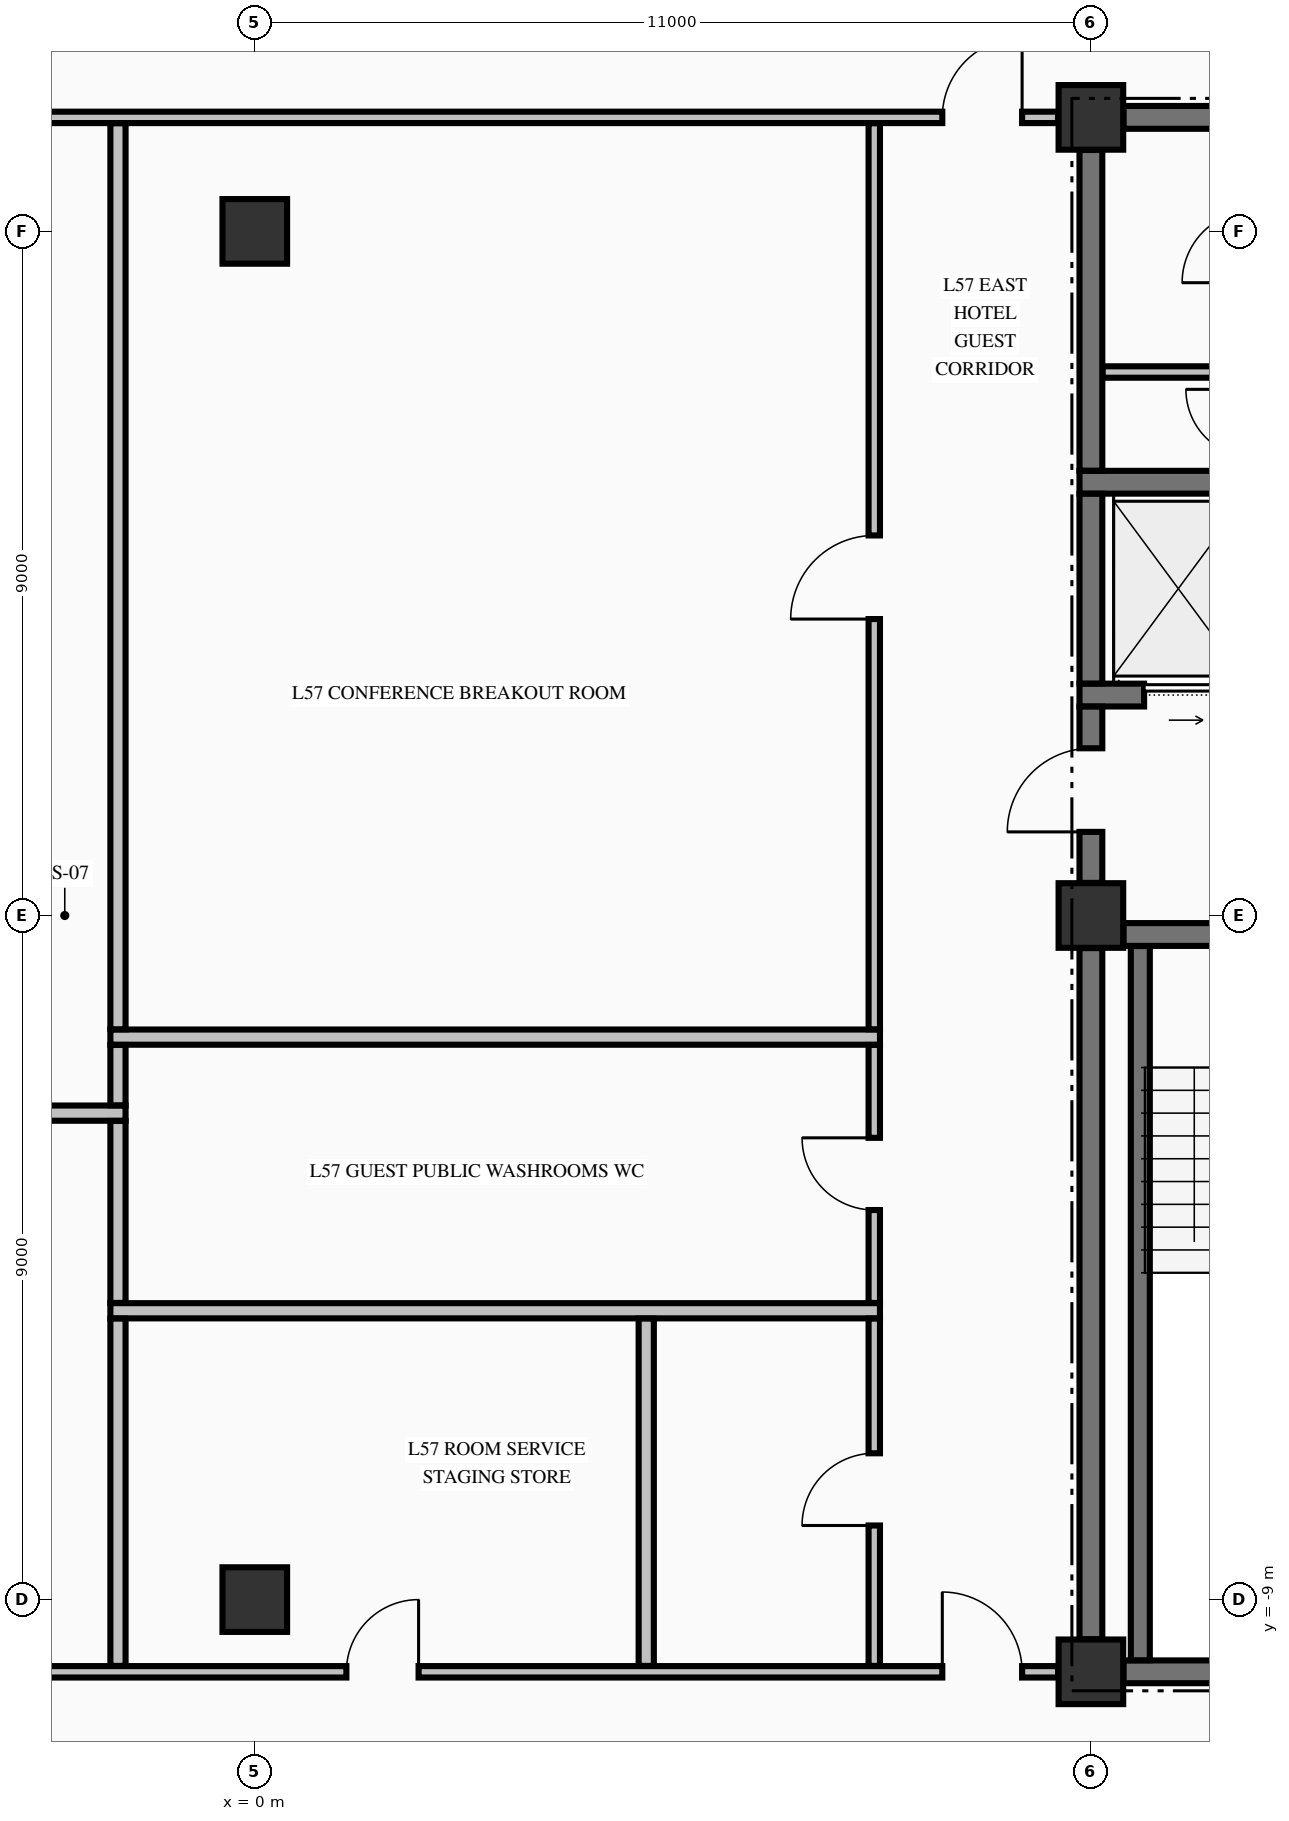
"""IFC4 building model, lengths in metres.
Left out: names, types, materials, properties, quantities, classifications, styles, units other than length and angle.
Written with IfcOpenShell. Run it as: python <this file> out.ifc"""

import sys

from ifc_helpers import new_model, si_unit, direction, frame, frame_2d, origin, origin_2d, place, context, subcontext, project, spatial, rectangle, extrude, element, fill, save


model = new_model("IFC4")
c1 = context("Model", 3, precision=1e-05, world=origin(), true_north=direction((0.0, 1.0)))
c2 = subcontext(c1, "Body", "Model", "MODEL_VIEW")
j1 = project(units=[si_unit("LENGTHUNIT", "METRE"), si_unit("PLANEANGLEUNIT", "RADIAN")], contexts=[c1])
p1 = place(None, origin())
s1 = spatial("IfcSite", under=j1, at=p1, CompositionType="ELEMENT")
p2 = place(p1, origin())
s2 = spatial("IfcBuilding", under=s1, at=p2, CompositionType="ELEMENT")
p3 = place(p2, frame((0.0, 0.0, 218.66)))
s3 = spatial("IfcBuildingStorey", under=s2, at=p3, CompositionType="ELEMENT", Elevation=218.66)
for number, where, z_axis, x_axis in (
    (1, (11.0, -9.95, -0.25), (0.0, 0.0, 1.0), (1.0, 0.0, 0.0)),
    (2, (11.0, 0.0, -0.25), (0.0, 0.0, 1.0), (1.0, 0.0, 0.0)),
    (3, (11.0, 10.5, -0.25), (0.0, 0.0, 1.0), (1.0, 0.0, 0.0)),
    (4, (0.0, -9.0, -0.25), (0.0, 0.0, 1.0), (1.0, 0.0, 0.0)),
    (5, (0.0, 9.0, -0.25), (0.0, 0.0, 1.0), (1.0, 0.0, 0.0)),
):
    element("IfcColumn", number, at=place(p3, frame(where, z_axis=z_axis, x_axis=x_axis)), inside=s3, PredefinedType="COLUMN", context=c2, shape_type="SweptSolid", body=[
        extrude(rectangle(XDim=0.85, YDim=0.85, at=origin_2d()), origin(), (0.0, 0.0, 1.0), 3.225),
    ])
p4 = place(p3, frame((11.429, -9.95, 0.0), z_axis=(0.0, 0.0, 1.0), x_axis=(1.0, 0.0, 0.0)))
e6 = element("IfcWall", 6, at=p4, inside=s3, PredefinedType="SHEAR", context=c2, shape_type="SweptSolid", body=[
    extrude(rectangle(XDim=3.271, YDim=0.3, at=frame_2d((1.635, 0.0))), origin(), (0.0, 0.0, 1.0), 2.975),
])
p5 = place(p3, frame((11.429, -0.25, 0.0), z_axis=(0.0, 0.0, 1.0), x_axis=(1.0, 0.0, 0.0)))
e7 = element("IfcWall", 7, at=p5, inside=s3, PredefinedType="SHEAR", context=c2, shape_type="SweptSolid", body=[
    extrude(rectangle(XDim=3.446, YDim=0.3, at=frame_2d((1.723, 0.0))), origin(), (0.0, 0.0, 1.0), 2.975),
])
p6 = place(p5, frame((1.171, 0.0, 0.0)))
e8 = element("IfcOpeningElement", 8, at=p6, cuts=e7, PredefinedType="OPENING", context=c2, shape_type="SweptSolid", body=[
    extrude(rectangle(XDim=1.1, YDim=2.15, at=frame_2d((0.55, 1.075))), frame((0.0, 0.16, 0.0), z_axis=(0.0, -1.0, 0.0), x_axis=(1.0, 0.0, 0.0)), (0.0, 0.0, 1.0), 0.32),
])
p7 = place(p3, frame((10.85, 2.9, 0.0), z_axis=(0.0, 0.0, 1.0), x_axis=(1.0, 0.0, 0.0)))
e9 = element("IfcWall", 9, at=p7, inside=s3, PredefinedType="SHEAR", context=c2, shape_type="SweptSolid", body=[
    extrude(rectangle(XDim=4.025, YDim=0.3, at=frame_2d((2.012, 0.0))), origin(), (0.0, 0.0, 1.0), 2.975),
])
p8 = place(p7, frame((0.85, 0.0, 0.0)))
e10 = element("IfcOpeningElement", 10, at=p8, cuts=e9, PredefinedType="OPENING", context=c2, shape_type="SweptSolid", body=[
    extrude(rectangle(XDim=1.1, YDim=2.2, at=frame_2d((0.55, 1.1))), frame((0.0, 0.16, 0.0), z_axis=(0.0, -1.0, 0.0), x_axis=(1.0, 0.0, 0.0)), (0.0, 0.0, 1.0), 0.32),
])
p9 = place(p3, frame((10.85, 5.7, 0.0), z_axis=(0.0, 0.0, 1.0), x_axis=(1.0, 0.0, 0.0)))
e11 = element("IfcWall", 11, at=p9, inside=s3, PredefinedType="SHEAR", context=c2, shape_type="SweptSolid", body=[
    extrude(rectangle(XDim=4.025, YDim=0.3, at=frame_2d((2.012, 0.0))), origin(), (0.0, 0.0, 1.0), 2.975),
])
p10 = place(p3, frame((11.429, 10.5, 0.0), z_axis=(0.0, 0.0, 1.0), x_axis=(1.0, 0.0, 0.0)))
e12 = element("IfcWall", 12, at=p10, inside=s3, PredefinedType="SHEAR", context=c2, shape_type="SweptSolid", body=[
    extrude(rectangle(XDim=3.271, YDim=0.3, at=frame_2d((1.635, 0.0))), origin(), (0.0, 0.0, 1.0), 2.975),
])
p11 = place(p10, frame((2.016, 0.0, 0.0)))
e13 = element("IfcOpeningElement", 13, at=p11, cuts=e12, PredefinedType="OPENING", context=c2, shape_type="SweptSolid", body=[
    extrude(rectangle(XDim=0.95, YDim=2.02, at=frame_2d((0.475, 1.01))), frame((0.0, 0.16, 0.0), z_axis=(0.0, -1.0, 0.0), x_axis=(1.0, 0.0, 0.0)), (0.0, 0.0, 1.0), 0.32),
])
p12 = place(p3, frame((-10.569, -9.95, 0.0), z_axis=(0.0, 0.0, 1.0), x_axis=(1.0, 0.0, 0.0)))
e14 = element("IfcWall", 14, at=p12, inside=s3, PredefinedType="PARTITIONING", context=c2, shape_type="SweptSolid", body=[
    extrude(rectangle(XDim=21.138, YDim=0.15, at=frame_2d((10.569, 0.0))), origin(), (0.0, 0.0, 1.0), 2.975),
])
p13 = place(p12, frame((0.474, 0.0, 0.0)))
e15 = element("IfcOpeningElement", 15, at=p13, cuts=e14, PredefinedType="OPENING", context=c2, shape_type="SweptSolid", body=[
    extrude(rectangle(XDim=1.05, YDim=2.15, at=frame_2d((0.525, 1.075))), frame((0.0, 0.085, 0.0), z_axis=(0.0, -1.0, 0.0), x_axis=(1.0, 0.0, 0.0)), (0.0, 0.0, 1.0), 0.17),
])
p14 = place(p12, frame((19.614, 0.0, 0.0)))
e16 = element("IfcOpeningElement", 16, at=p14, cuts=e14, PredefinedType="OPENING", context=c2, shape_type="SweptSolid", body=[
    extrude(rectangle(XDim=1.05, YDim=2.15, at=frame_2d((0.525, 1.075))), frame((0.0, 0.085, 0.0), z_axis=(0.0, -1.0, 0.0), x_axis=(1.0, 0.0, 0.0)), (0.0, 0.0, 1.0), 0.17),
])
p15 = place(p12, frame((11.774, 0.0, 0.0)))
e17 = element("IfcOpeningElement", 17, at=p15, cuts=e14, PredefinedType="OPENING", context=c2, shape_type="SweptSolid", body=[
    extrude(rectangle(XDim=0.95, YDim=2.15, at=frame_2d((0.475, 1.075))), frame((0.0, 0.085, 0.0), z_axis=(0.0, -1.0, 0.0), x_axis=(1.0, 0.0, 0.0)), (0.0, 0.0, 1.0), 0.17),
])
p16 = place(p3, frame((-1.9, -5.2, 0.0), z_axis=(0.0, 0.0, 1.0), x_axis=(1.0, 0.0, 0.0)))
e18 = element("IfcWall", 18, at=p16, inside=s3, PredefinedType="PARTITIONING", context=c2, shape_type="SweptSolid", body=[
    extrude(rectangle(XDim=10.125, YDim=0.2, at=frame_2d((5.062, 0.0))), origin(), (0.0, 0.0, 1.0), 2.975),
])
p17 = place(p3, frame((-8.225, -2.6, 0.0), z_axis=(0.0, 0.0, 1.0), x_axis=(1.0, 0.0, 0.0)))
e19 = element("IfcWall", 19, at=p17, inside=s3, PredefinedType="PARTITIONING", context=c2, shape_type="SweptSolid", body=[
    extrude(rectangle(XDim=6.525, YDim=0.2, at=frame_2d((3.263, 0.0))), origin(), (0.0, 0.0, 1.0), 2.975),
])
p18 = place(p3, frame((-1.9, -1.6, 0.0), z_axis=(0.0, 0.0, 1.0), x_axis=(1.0, 0.0, 0.0)))
e20 = element("IfcWall", 20, at=p18, inside=s3, PredefinedType="PARTITIONING", context=c2, shape_type="SweptSolid", body=[
    extrude(rectangle(XDim=10.125, YDim=0.2, at=frame_2d((5.062, 0.0))), origin(), (0.0, 0.0, 1.0), 2.975),
])
p19 = place(p3, frame((11.153, 7.15, 0.0), z_axis=(0.0, 0.0, 1.0), x_axis=(1.0, 0.0, 0.0)))
e21 = element("IfcWall", 21, at=p19, inside=s3, PredefinedType="PARTITIONING", context=c2, shape_type="SweptSolid", body=[
    extrude(rectangle(XDim=2.072, YDim=0.15, at=frame_2d((1.036, 0.0))), origin(), (0.0, 0.0, 1.0), 2.975),
])
p20 = place(p3, frame((-10.569, 10.5, 0.0), z_axis=(0.0, 0.0, 1.0), x_axis=(1.0, 0.0, 0.0)))
e22 = element("IfcWall", 22, at=p20, inside=s3, PredefinedType="PARTITIONING", context=c2, shape_type="SweptSolid", body=[
    extrude(rectangle(XDim=21.138, YDim=0.15, at=frame_2d((10.569, 0.0))), origin(), (0.0, 0.0, 1.0), 2.975),
])
p21 = place(p20, frame((0.474, 0.0, 0.0)))
e23 = element("IfcOpeningElement", 23, at=p21, cuts=e22, PredefinedType="OPENING", context=c2, shape_type="SweptSolid", body=[
    extrude(rectangle(XDim=1.05, YDim=2.15, at=frame_2d((0.525, 1.075))), frame((0.0, 0.085, 0.0), z_axis=(0.0, -1.0, 0.0), x_axis=(1.0, 0.0, 0.0)), (0.0, 0.0, 1.0), 0.17),
])
p22 = place(p20, frame((19.614, 0.0, 0.0)))
e24 = element("IfcOpeningElement", 24, at=p22, cuts=e22, PredefinedType="OPENING", context=c2, shape_type="SweptSolid", body=[
    extrude(rectangle(XDim=1.05, YDim=2.15, at=frame_2d((0.525, 1.075))), frame((0.0, 0.085, 0.0), z_axis=(0.0, -1.0, 0.0), x_axis=(1.0, 0.0, 0.0)), (0.0, 0.0, 1.0), 0.17),
])
p23 = place(p3, frame((11.0, -9.521, 0.0), z_axis=(0.0, 0.0, 1.0), x_axis=(0.0, 1.0, 0.0)))
e25 = element("IfcWall", 25, at=p23, inside=s3, PredefinedType="SHEAR", context=c2, shape_type="SweptSolid", body=[
    extrude(rectangle(XDim=9.092, YDim=0.3, at=frame_2d((4.546, 0.0))), origin(), (0.0, 0.0, 1.0), 2.975),
])
p24 = place(p3, frame((11.0, 0.429, 0.0), z_axis=(0.0, 0.0, 1.0), x_axis=(0.0, 1.0, 0.0)))
e26 = element("IfcWall", 26, at=p24, inside=s3, PredefinedType="SHEAR", context=c2, shape_type="SweptSolid", body=[
    extrude(rectangle(XDim=2.319, YDim=0.3, at=frame_2d((1.16, 0.0))), origin(), (0.0, 0.0, 1.0), 2.975),
])
p25 = place(p24, frame((0.671, 0.0, 0.0)))
e27 = element("IfcOpeningElement", 27, at=p25, cuts=e26, PredefinedType="OPENING", context=c2, shape_type="SweptSolid", body=[
    extrude(rectangle(XDim=1.1, YDim=2.15, at=frame_2d((0.55, 1.075))), frame((0.0, 0.16, 0.0), z_axis=(0.0, -1.0, 0.0), x_axis=(1.0, 0.0, 0.0)), (0.0, 0.0, 1.0), 0.32),
])
p26 = place(p3, frame((11.0, 3.052, 0.0), z_axis=(0.0, 0.0, 1.0), x_axis=(0.0, 1.0, 0.0)))
e28 = element("IfcWall", 28, at=p26, inside=s3, PredefinedType="SHEAR", context=c2, shape_type="SweptSolid", body=[
    extrude(rectangle(XDim=2.496, YDim=0.3, at=frame_2d((1.248, 0.0))), origin(), (0.0, 0.0, 1.0), 2.975),
])
p27 = place(p3, frame((11.0, 5.852, 0.0), z_axis=(0.0, 0.0, 1.0), x_axis=(0.0, 1.0, 0.0)))
e29 = element("IfcWall", 29, at=p27, inside=s3, PredefinedType="SHEAR", context=c2, shape_type="SweptSolid", body=[
    extrude(rectangle(XDim=4.219, YDim=0.3, at=frame_2d((2.109, 0.0))), origin(), (0.0, 0.0, 1.0), 2.975),
])
p28 = place(p3, frame((11.65, -9.798, 0.0), z_axis=(0.0, 0.0, 1.0), x_axis=(0.0, 1.0, 0.0)))
e30 = element("IfcWall", 30, at=p28, inside=s3, PredefinedType="SOLIDWALL", context=c2, shape_type="SweptSolid", body=[
    extrude(rectangle(XDim=9.396, YDim=0.25, at=frame_2d((4.698, 0.0))), origin(), (0.0, 0.0, 1.0), 2.975),
])
p29 = place(p3, frame((-1.8, -9.872, 0.0), z_axis=(0.0, 0.0, 1.0), x_axis=(0.0, 1.0, 0.0)))
e31 = element("IfcWall", 31, at=p29, inside=s3, PredefinedType="PARTITIONING", context=c2, shape_type="SweptSolid", body=[
    extrude(rectangle(XDim=4.569, YDim=0.2, at=frame_2d((2.285, 0.0))), origin(), (0.0, 0.0, 1.0), 2.975),
])
p30 = place(p3, frame((-1.8, -5.097, 0.0), z_axis=(0.0, 0.0, 1.0), x_axis=(0.0, 1.0, 0.0)))
e32 = element("IfcWall", 32, at=p30, inside=s3, PredefinedType="PARTITIONING", context=c2, shape_type="SweptSolid", body=[
    extrude(rectangle(XDim=2.394, YDim=0.2, at=frame_2d((1.197, 0.0))), origin(), (0.0, 0.0, 1.0), 2.975),
])
p31 = place(p3, frame((-1.8, -2.497, 0.0), z_axis=(0.0, 0.0, 1.0), x_axis=(0.0, 1.0, 0.0)))
e33 = element("IfcWall", 33, at=p31, inside=s3, PredefinedType="PARTITIONING", context=c2, shape_type="SweptSolid", body=[
    extrude(rectangle(XDim=0.794, YDim=0.2, at=frame_2d((0.397, 0.0))), origin(), (0.0, 0.0, 1.0), 2.975),
])
p32 = place(p3, frame((-1.8, -1.497, 0.0), z_axis=(0.0, 0.0, 1.0), x_axis=(0.0, 1.0, 0.0)))
e34 = element("IfcWall", 34, at=p32, inside=s3, PredefinedType="PARTITIONING", context=c2, shape_type="SweptSolid", body=[
    extrude(rectangle(XDim=11.919, YDim=0.2, at=frame_2d((5.959, 0.0))), origin(), (0.0, 0.0, 1.0), 2.975),
])
p33 = place(p3, frame((5.15, -9.872, 0.0), z_axis=(0.0, 0.0, 1.0), x_axis=(0.0, 1.0, 0.0)))
e35 = element("IfcWall", 35, at=p33, inside=s3, PredefinedType="PARTITIONING", context=c2, shape_type="SweptSolid", body=[
    extrude(rectangle(XDim=4.569, YDim=0.2, at=frame_2d((2.285, 0.0))), origin(), (0.0, 0.0, 1.0), 2.975),
])
p34 = place(p3, frame((8.15, -9.872, 0.0), z_axis=(0.0, 0.0, 1.0), x_axis=(0.0, 1.0, 0.0)))
e36 = element("IfcWall", 36, at=p34, inside=s3, PredefinedType="PARTITIONING", context=c2, shape_type="SweptSolid", body=[
    extrude(rectangle(XDim=4.569, YDim=0.15, at=frame_2d((2.285, 0.0))), origin(), (0.0, 0.0, 1.0), 2.975),
])
p35 = place(p34, frame((1.847, 0.0, 0.0)))
e37 = element("IfcOpeningElement", 37, at=p35, cuts=e36, PredefinedType="OPENING", context=c2, shape_type="SweptSolid", body=[
    extrude(rectangle(XDim=0.95, YDim=2.15, at=frame_2d((0.475, 1.075))), frame((0.0, 0.085, 0.0), z_axis=(0.0, -1.0, 0.0), x_axis=(1.0, 0.0, 0.0)), (0.0, 0.0, 1.0), 0.17),
])
p36 = place(p3, frame((8.15, -5.097, 0.0), z_axis=(0.0, 0.0, 1.0), x_axis=(0.0, 1.0, 0.0)))
e38 = element("IfcWall", 38, at=p36, inside=s3, PredefinedType="PARTITIONING", context=c2, shape_type="SweptSolid", body=[
    extrude(rectangle(XDim=3.394, YDim=0.15, at=frame_2d((1.697, 0.0))), origin(), (0.0, 0.0, 1.0), 2.975),
])
p37 = place(p36, frame((1.222, 0.0, 0.0)))
e39 = element("IfcOpeningElement", 39, at=p37, cuts=e38, PredefinedType="OPENING", context=c2, shape_type="SweptSolid", body=[
    extrude(rectangle(XDim=0.95, YDim=2.15, at=frame_2d((0.475, 1.075))), frame((0.0, 0.085, 0.0), z_axis=(0.0, -1.0, 0.0), x_axis=(1.0, 0.0, 0.0)), (0.0, 0.0, 1.0), 0.17),
])
p38 = place(p3, frame((8.15, -1.497, 0.0), z_axis=(0.0, 0.0, 1.0), x_axis=(0.0, 1.0, 0.0)))
e40 = element("IfcWall", 40, at=p38, inside=s3, PredefinedType="PARTITIONING", context=c2, shape_type="SweptSolid", body=[
    extrude(rectangle(XDim=11.919, YDim=0.15, at=frame_2d((5.959, 0.0))), origin(), (0.0, 0.0, 1.0), 2.975),
])
p39 = place(p38, frame((5.397, 0.0, 0.0)))
e41 = element("IfcOpeningElement", 41, at=p39, cuts=e40, PredefinedType="OPENING", context=c2, shape_type="SweptSolid", body=[
    extrude(rectangle(XDim=1.1, YDim=2.15, at=frame_2d((0.55, 1.075))), frame((0.0, 0.085, 0.0), z_axis=(0.0, -1.0, 0.0), x_axis=(1.0, 0.0, 0.0)), (0.0, 0.0, 1.0), 0.17),
])
p40 = place(p25, origin())
e42 = element("IfcDoor", 42, at=p40, inside=s3, OperationType="SINGLE_SWING_LEFT", PredefinedType="DOOR", context=c2, shape_type="SweptSolid", body=[
    extrude(rectangle(XDim=1.1, YDim=2.15, at=frame_2d((0.55, 1.075))), frame((0.0, 0.025, 0.0), z_axis=(0.0, -1.0, 0.0), x_axis=(1.0, 0.0, 0.0)), (0.0, 0.0, 1.0), 0.05),
])
fill(e27, e42)
p41 = place(p8, origin())
e43 = element("IfcDoor", 43, at=p41, inside=s3, OperationType="SLIDING_TO_RIGHT", PredefinedType="DOOR", context=c2, shape_type="SweptSolid", body=[
    extrude(rectangle(XDim=1.1, YDim=2.2, at=frame_2d((0.55, 1.1))), frame((0.0, 0.025, 0.0), z_axis=(0.0, -1.0, 0.0), x_axis=(1.0, 0.0, 0.0)), (0.0, 0.0, 1.0), 0.05),
])
fill(e10, e43)
p42 = place(p22, origin())
e44 = element("IfcDoor", 44, at=p42, inside=s3, OperationType="SINGLE_SWING_RIGHT", PredefinedType="DOOR", context=c2, shape_type="SweptSolid", body=[
    extrude(rectangle(XDim=1.05, YDim=2.15, at=frame_2d((0.525, 1.075))), frame((0.0, 0.025, 0.0), z_axis=(0.0, -1.0, 0.0), x_axis=(1.0, 0.0, 0.0)), (0.0, 0.0, 1.0), 0.05),
])
fill(e24, e44)
p43 = place(p14, origin())
e45 = element("IfcDoor", 45, at=p43, inside=s3, OperationType="SINGLE_SWING_LEFT", PredefinedType="DOOR", context=c2, shape_type="SweptSolid", body=[
    extrude(rectangle(XDim=1.05, YDim=2.15, at=frame_2d((0.525, 1.075))), frame((0.0, 0.025, 0.0), z_axis=(0.0, -1.0, 0.0), x_axis=(1.0, 0.0, 0.0)), (0.0, 0.0, 1.0), 0.05),
])
fill(e16, e45)
p44 = place(p39, origin())
e46 = element("IfcDoor", 46, at=p44, inside=s3, OperationType="SINGLE_SWING_LEFT", PredefinedType="DOOR", context=c2, shape_type="SweptSolid", body=[
    extrude(rectangle(XDim=1.1, YDim=2.15, at=frame_2d((0.55, 1.075))), frame((0.0, 0.025, 0.0), z_axis=(0.0, -1.0, 0.0), x_axis=(1.0, 0.0, 0.0)), (0.0, 0.0, 1.0), 0.05),
])
fill(e41, e46)
p45 = place(p37, origin())
e47 = element("IfcDoor", 47, at=p45, inside=s3, OperationType="SINGLE_SWING_RIGHT", PredefinedType="DOOR", context=c2, shape_type="SweptSolid", body=[
    extrude(rectangle(XDim=0.95, YDim=2.15, at=frame_2d((0.475, 1.075))), frame((0.0, 0.025, 0.0), z_axis=(0.0, -1.0, 0.0), x_axis=(1.0, 0.0, 0.0)), (0.0, 0.0, 1.0), 0.05),
])
fill(e39, e47)
p46 = place(p35, origin())
e48 = element("IfcDoor", 48, at=p46, inside=s3, OperationType="SINGLE_SWING_LEFT", PredefinedType="DOOR", context=c2, shape_type="SweptSolid", body=[
    extrude(rectangle(XDim=0.95, YDim=2.15, at=frame_2d((0.475, 1.075))), frame((0.0, 0.025, 0.0), z_axis=(0.0, -1.0, 0.0), x_axis=(1.0, 0.0, 0.0)), (0.0, 0.0, 1.0), 0.05),
])
fill(e37, e48)
p47 = place(p15, origin())
e49 = element("IfcDoor", 49, at=p47, inside=s3, OperationType="SINGLE_SWING_RIGHT", PredefinedType="DOOR", context=c2, shape_type="SweptSolid", body=[
    extrude(rectangle(XDim=0.95, YDim=2.15, at=frame_2d((0.475, 1.075))), frame((0.0, 0.025, 0.0), z_axis=(0.0, -1.0, 0.0), x_axis=(1.0, 0.0, 0.0)), (0.0, 0.0, 1.0), 0.05),
])
fill(e17, e49)
save(model, sys.argv[1])
